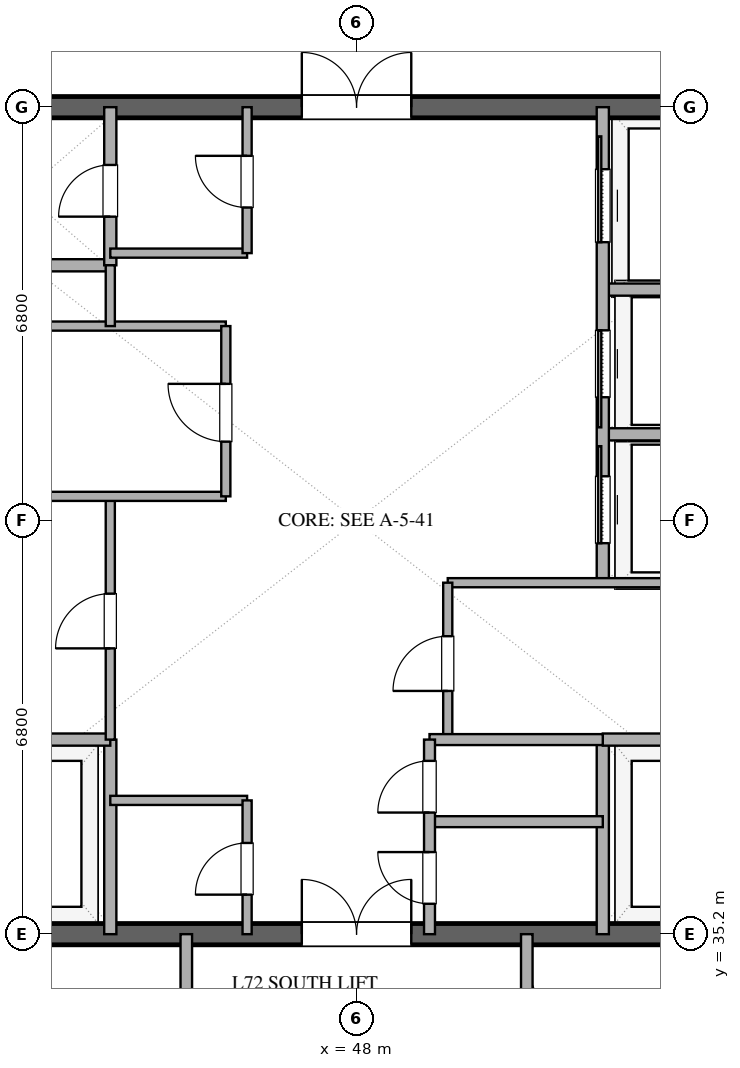
"""IFC4 building model, lengths in metres.
Left out: names, types, materials, properties, quantities, classifications, styles, units other than length and angle.
Written with IfcOpenShell. Run it as: python <this file> out.ifc"""

import sys

from ifc_helpers import new_model, si_unit, direction, frame, frame_2d, origin, place, context, subcontext, project, spatial, rectangle, extrude, element, fill, save


model = new_model("IFC4")
c1 = context("Model", 3, precision=1e-05, world=origin(), true_north=direction((0.0, 1.0)))
c2 = subcontext(c1, "Body", "Model", "MODEL_VIEW")
j1 = project(units=[si_unit("LENGTHUNIT", "METRE"), si_unit("PLANEANGLEUNIT", "RADIAN")], contexts=[c1])
p1 = place(None, origin())
s1 = spatial("IfcSite", under=j1, at=p1, CompositionType="ELEMENT")
p2 = place(p1, origin())
s2 = spatial("IfcBuilding", under=s1, at=p2, CompositionType="ELEMENT")
p3 = place(p2, frame((0.0, 0.0, 280.2)))
s3 = spatial("IfcBuildingStorey", under=s2, at=p3, CompositionType="ELEMENT", Elevation=280.2)
p4 = place(p3, frame((41.0, 35.2, 0.0), z_axis=(0.0, 0.0, 1.0), x_axis=(1.0, 0.0, 0.0)))
e1 = element("IfcWall", 1, at=p4, inside=s3, PredefinedType="SHEAR", context=c2, shape_type="SweptSolid", body=[
    extrude(rectangle(XDim=14.0, YDim=0.35, at=frame_2d((7.0, 0.0))), origin(), (0.0, 0.0, 1.0), 3.37),
])
p5 = place(p4, frame((6.1, 0.0, 0.0)))
e2 = element("IfcOpeningElement", 2, at=p5, cuts=e1, PredefinedType="OPENING", context=c2, shape_type="SweptSolid", body=[
    extrude(rectangle(XDim=1.8, YDim=2.25, at=frame_2d((0.9, 1.125))), frame((0.0, 0.185, 0.0), z_axis=(0.0, -1.0, 0.0), x_axis=(1.0, 0.0, 0.0)), (0.0, 0.0, 1.0), 0.37),
])
p6 = place(p3, frame((41.0, 48.8, 0.0), z_axis=(0.0, 0.0, 1.0), x_axis=(1.0, 0.0, 0.0)))
e3 = element("IfcWall", 3, at=p6, inside=s3, PredefinedType="SHEAR", context=c2, shape_type="SweptSolid", body=[
    extrude(rectangle(XDim=14.0, YDim=0.35, at=frame_2d((7.0, 0.0))), origin(), (0.0, 0.0, 1.0), 3.37),
])
p7 = place(p6, frame((6.1, 0.0, 0.0)))
e4 = element("IfcOpeningElement", 4, at=p7, cuts=e3, PredefinedType="OPENING", context=c2, shape_type="SweptSolid", body=[
    extrude(rectangle(XDim=1.8, YDim=2.25, at=frame_2d((0.9, 1.125))), frame((0.0, 0.185, 0.0), z_axis=(0.0, -1.0, 0.0), x_axis=(1.0, 0.0, 0.0)), (0.0, 0.0, 1.0), 0.37),
])
p8 = place(p3, frame((43.95, 35.2, 0.0), z_axis=(0.0, 0.0, 1.0), x_axis=(0.0, 1.0, 0.0)))
e5 = element("IfcWall", 5, at=p8, inside=s3, PredefinedType="SOLIDWALL", context=c2, shape_type="SweptSolid", body=[
    extrude(rectangle(XDim=3.2, YDim=0.2, at=frame_2d((1.6, 0.0))), origin(), (0.0, 0.0, 1.0), 2.73),
])
p9 = place(p3, frame((41.0, 38.4, 0.0), z_axis=(0.0, 0.0, 1.0), x_axis=(1.0, 0.0, 0.0)))
e6 = element("IfcWall", 6, at=p9, inside=s3, PredefinedType="SOLIDWALL", context=c2, shape_type="SweptSolid", body=[
    extrude(rectangle(XDim=2.95, YDim=0.2, at=frame_2d((1.475, 0.0))), origin(), (0.0, 0.0, 1.0), 2.73),
])
p10 = place(p3, frame((52.05, 35.2, 0.0), z_axis=(0.0, 0.0, 1.0), x_axis=(0.0, 1.0, 0.0)))
e7 = element("IfcWall", 7, at=p10, inside=s3, PredefinedType="SOLIDWALL", context=c2, shape_type="SweptSolid", body=[
    extrude(rectangle(XDim=3.2, YDim=0.2, at=frame_2d((1.6, 0.0))), origin(), (0.0, 0.0, 1.0), 2.73),
])
for number, where, z_axis, x_axis in (
    (8, (52.05, 38.4, 0.0), (0.0, 0.0, 1.0), (1.0, 0.0, 0.0)),
    (9, (41.0, 46.2, 0.0), (0.0, 0.0, 1.0), (1.0, 0.0, 0.0)),
):
    element("IfcWall", number, at=place(p3, frame(where, z_axis=z_axis, x_axis=x_axis)), inside=s3, PredefinedType="SOLIDWALL", context=c2, shape_type="SweptSolid", body=[
        extrude(rectangle(XDim=2.95, YDim=0.2, at=frame_2d((1.475, 0.0))), origin(), (0.0, 0.0, 1.0), 2.73),
    ])
p11 = place(p3, frame((43.95, 46.2, 0.0), z_axis=(0.0, 0.0, 1.0), x_axis=(0.0, 1.0, 0.0)))
e10 = element("IfcWall", 10, at=p11, inside=s3, PredefinedType="SOLIDWALL", context=c2, shape_type="SweptSolid", body=[
    extrude(rectangle(XDim=2.6, YDim=0.2, at=frame_2d((1.3, 0.0))), origin(), (0.0, 0.0, 1.0), 2.73),
])
p12 = place(p11, frame((0.8, 0.0, 0.0)))
e11 = element("IfcOpeningElement", 11, at=p12, cuts=e10, PredefinedType="OPENING", context=c2, shape_type="SweptSolid", body=[
    extrude(rectangle(XDim=0.85, YDim=2.15, at=frame_2d((0.425, 1.075))), frame((0.0, 0.11, 0.0), z_axis=(0.0, -1.0, 0.0), x_axis=(1.0, 0.0, 0.0)), (0.0, 0.0, 1.0), 0.22),
])
p13 = place(p3, frame((43.95, 38.4, 0.0), z_axis=(0.0, 0.0, 1.0), x_axis=(0.0, 1.0, 0.0)))
e12 = element("IfcWall", 12, at=p13, inside=s3, PredefinedType="PARTITIONING", context=c2, shape_type="SweptSolid", body=[
    extrude(rectangle(XDim=4.0, YDim=0.15, at=frame_2d((2.0, 0.0))), origin(), (0.0, 0.0, 1.0), 2.73),
])
p14 = place(p13, frame((1.5, 0.0, 0.0)))
e13 = element("IfcOpeningElement", 13, at=p14, cuts=e12, PredefinedType="OPENING", context=c2, shape_type="SweptSolid", body=[
    extrude(rectangle(XDim=0.9, YDim=2.15, at=frame_2d((0.45, 1.075))), frame((0.0, 0.085, 0.0), z_axis=(0.0, -1.0, 0.0), x_axis=(1.0, 0.0, 0.0)), (0.0, 0.0, 1.0), 0.17),
])
for number, where, z_axis, x_axis in (
    (14, (41.0, 42.4, 0.0), (0.0, 0.0, 1.0), (1.0, 0.0, 0.0)),
    (15, (41.0, 45.2, 0.0), (0.0, 0.0, 1.0), (1.0, 0.0, 0.0)),
):
    element("IfcWall", number, at=place(p3, frame(where, z_axis=z_axis, x_axis=x_axis)), inside=s3, PredefinedType="PARTITIONING", context=c2, shape_type="SweptSolid", body=[
        extrude(rectangle(XDim=4.85, YDim=0.15, at=frame_2d((2.425, 0.0))), origin(), (0.0, 0.0, 1.0), 2.73),
    ])
p15 = place(p3, frame((43.95, 45.2, 0.0), z_axis=(0.0, 0.0, 1.0), x_axis=(0.0, 1.0, 0.0)))
e16 = element("IfcWall", 16, at=p15, inside=s3, PredefinedType="PARTITIONING", context=c2, shape_type="SweptSolid", body=[
    extrude(rectangle(XDim=1.0, YDim=0.15, at=frame_2d((0.5, 0.0))), origin(), (0.0, 0.0, 1.0), 2.73),
])
p16 = place(p3, frame((45.85, 42.4, 0.0), z_axis=(0.0, 0.0, 1.0), x_axis=(0.0, 1.0, 0.0)))
e17 = element("IfcWall", 17, at=p16, inside=s3, PredefinedType="PARTITIONING", context=c2, shape_type="SweptSolid", body=[
    extrude(rectangle(XDim=2.8, YDim=0.15, at=frame_2d((1.4, 0.0))), origin(), (0.0, 0.0, 1.0), 2.73),
])
p17 = place(p16, frame((0.9, 0.0, 0.0)))
e18 = element("IfcOpeningElement", 18, at=p17, cuts=e17, PredefinedType="OPENING", context=c2, shape_type="SweptSolid", body=[
    extrude(rectangle(XDim=0.95, YDim=2.15, at=frame_2d((0.475, 1.075))), frame((0.0, 0.085, 0.0), z_axis=(0.0, -1.0, 0.0), x_axis=(1.0, 0.0, 0.0)), (0.0, 0.0, 1.0), 0.17),
])
for number, where, z_axis, x_axis in (
    (19, (52.05, 43.42, 0.0), (0.0, 0.0, 1.0), (1.0, 0.0, 0.0)),
    (20, (52.05, 45.8, 0.0), (0.0, 0.0, 1.0), (1.0, 0.0, 0.0)),
):
    element("IfcWall", number, at=place(p3, frame(where, z_axis=z_axis, x_axis=x_axis)), inside=s3, PredefinedType="SOLIDWALL", context=c2, shape_type="SweptSolid", body=[
        extrude(rectangle(XDim=2.95, YDim=0.2, at=frame_2d((1.475, 0.0))), origin(), (0.0, 0.0, 1.0), 2.73),
    ])
p18 = place(p3, frame((52.05, 40.98, 0.0), z_axis=(0.0, 0.0, 1.0), x_axis=(0.0, 1.0, 0.0)))
e21 = element("IfcWall", 21, at=p18, inside=s3, PredefinedType="SOLIDWALL", context=c2, shape_type="SweptSolid", body=[
    extrude(rectangle(XDim=7.82, YDim=0.2, at=frame_2d((3.91, 0.0))), origin(), (0.0, 0.0, 1.0), 2.73),
])
p19 = place(p18, frame((0.65, 0.0, 0.0)))
e22 = element("IfcOpeningElement", 22, at=p19, cuts=e21, PredefinedType="OPENING", context=c2, shape_type="SweptSolid", body=[
    extrude(rectangle(XDim=1.1, YDim=2.2, at=frame_2d((0.55, 1.1))), frame((0.0, 0.11, 0.0), z_axis=(0.0, -1.0, 0.0), x_axis=(1.0, 0.0, 0.0)), (0.0, 0.0, 1.0), 0.22),
])
p20 = place(p18, frame((3.05, 0.0, 0.0)))
e23 = element("IfcOpeningElement", 23, at=p20, cuts=e21, PredefinedType="OPENING", context=c2, shape_type="SweptSolid", body=[
    extrude(rectangle(XDim=1.1, YDim=2.2, at=frame_2d((0.55, 1.1))), frame((0.0, 0.11, 0.0), z_axis=(0.0, -1.0, 0.0), x_axis=(1.0, 0.0, 0.0)), (0.0, 0.0, 1.0), 0.22),
])
p21 = place(p18, frame((5.6, 0.0, 0.0)))
e24 = element("IfcOpeningElement", 24, at=p21, cuts=e21, PredefinedType="OPENING", context=c2, shape_type="SweptSolid", body=[
    extrude(rectangle(XDim=1.2, YDim=2.2, at=frame_2d((0.6, 1.1))), frame((0.0, 0.11, 0.0), z_axis=(0.0, -1.0, 0.0), x_axis=(1.0, 0.0, 0.0)), (0.0, 0.0, 1.0), 0.22),
])
p22 = place(p3, frame((49.5, 40.98, 0.0), z_axis=(0.0, 0.0, 1.0), x_axis=(1.0, 0.0, 0.0)))
e25 = element("IfcWall", 25, at=p22, inside=s3, PredefinedType="PARTITIONING", context=c2, shape_type="SweptSolid", body=[
    extrude(rectangle(XDim=5.5, YDim=0.15, at=frame_2d((2.75, 0.0))), origin(), (0.0, 0.0, 1.0), 2.73),
])
p23 = place(p3, frame((49.5, 38.4, 0.0), z_axis=(0.0, 0.0, 1.0), x_axis=(0.0, 1.0, 0.0)))
e26 = element("IfcWall", 26, at=p23, inside=s3, PredefinedType="PARTITIONING", context=c2, shape_type="SweptSolid", body=[
    extrude(rectangle(XDim=2.58, YDim=0.15, at=frame_2d((1.29, 0.0))), origin(), (0.0, 0.0, 1.0), 2.73),
])
p24 = place(p23, frame((0.8, 0.0, 0.0)))
e27 = element("IfcOpeningElement", 27, at=p24, cuts=e26, PredefinedType="OPENING", context=c2, shape_type="SweptSolid", body=[
    extrude(rectangle(XDim=0.9, YDim=2.15, at=frame_2d((0.45, 1.075))), frame((0.0, 0.085, 0.0), z_axis=(0.0, -1.0, 0.0), x_axis=(1.0, 0.0, 0.0)), (0.0, 0.0, 1.0), 0.17),
])
p25 = place(p3, frame((43.95, 37.4, 0.0), z_axis=(0.0, 0.0, 1.0), x_axis=(1.0, 0.0, 0.0)))
e28 = element("IfcWall", 28, at=p25, inside=s3, PredefinedType="PARTITIONING", context=c2, shape_type="SweptSolid", body=[
    extrude(rectangle(XDim=2.25, YDim=0.15, at=frame_2d((1.125, 0.0))), origin(), (0.0, 0.0, 1.0), 2.73),
])
p26 = place(p3, frame((46.2, 35.2, 0.0), z_axis=(0.0, 0.0, 1.0), x_axis=(0.0, 1.0, 0.0)))
e29 = element("IfcWall", 29, at=p26, inside=s3, PredefinedType="PARTITIONING", context=c2, shape_type="SweptSolid", body=[
    extrude(rectangle(XDim=2.2, YDim=0.15, at=frame_2d((1.1, 0.0))), origin(), (0.0, 0.0, 1.0), 2.73),
])
p27 = place(p26, frame((0.65, 0.0, 0.0)))
e30 = element("IfcOpeningElement", 30, at=p27, cuts=e29, PredefinedType="OPENING", context=c2, shape_type="SweptSolid", body=[
    extrude(rectangle(XDim=0.85, YDim=2.15, at=frame_2d((0.425, 1.075))), frame((0.0, 0.085, 0.0), z_axis=(0.0, -1.0, 0.0), x_axis=(1.0, 0.0, 0.0)), (0.0, 0.0, 1.0), 0.17),
])
p28 = place(p3, frame((43.95, 46.4, 0.0), z_axis=(0.0, 0.0, 1.0), x_axis=(1.0, 0.0, 0.0)))
e31 = element("IfcWall", 31, at=p28, inside=s3, PredefinedType="PARTITIONING", context=c2, shape_type="SweptSolid", body=[
    extrude(rectangle(XDim=2.25, YDim=0.15, at=frame_2d((1.125, 0.0))), origin(), (0.0, 0.0, 1.0), 2.73),
])
p29 = place(p3, frame((46.2, 46.4, 0.0), z_axis=(0.0, 0.0, 1.0), x_axis=(0.0, 1.0, 0.0)))
e32 = element("IfcWall", 32, at=p29, inside=s3, PredefinedType="PARTITIONING", context=c2, shape_type="SweptSolid", body=[
    extrude(rectangle(XDim=2.4, YDim=0.15, at=frame_2d((1.2, 0.0))), origin(), (0.0, 0.0, 1.0), 2.73),
])
p30 = place(p29, frame((0.75, 0.0, 0.0)))
e33 = element("IfcOpeningElement", 33, at=p30, cuts=e32, PredefinedType="OPENING", context=c2, shape_type="SweptSolid", body=[
    extrude(rectangle(XDim=0.85, YDim=2.15, at=frame_2d((0.425, 1.075))), frame((0.0, 0.085, 0.0), z_axis=(0.0, -1.0, 0.0), x_axis=(1.0, 0.0, 0.0)), (0.0, 0.0, 1.0), 0.17),
])
for number, where, z_axis, x_axis in (
    (34, (49.2, 37.05, 0.0), (0.0, 0.0, 1.0), (1.0, 0.0, 0.0)),
    (35, (49.2, 38.4, 0.0), (0.0, 0.0, 1.0), (1.0, 0.0, 0.0)),
):
    element("IfcWall", number, at=place(p3, frame(where, z_axis=z_axis, x_axis=x_axis)), inside=s3, PredefinedType="PLUMBINGWALL", context=c2, shape_type="SweptSolid", body=[
        extrude(rectangle(XDim=2.85, YDim=0.18, at=frame_2d((1.425, 0.0))), origin(), (0.0, 0.0, 1.0), 2.73),
    ])
p31 = place(p3, frame((49.2, 35.2, 0.0), z_axis=(0.0, 0.0, 1.0), x_axis=(0.0, 1.0, 0.0)))
e36 = element("IfcWall", 36, at=p31, inside=s3, PredefinedType="PLUMBINGWALL", context=c2, shape_type="SweptSolid", body=[
    extrude(rectangle(XDim=3.2, YDim=0.18, at=frame_2d((1.6, 0.0))), origin(), (0.0, 0.0, 1.0), 2.73),
])
p32 = place(p31, frame((0.5, 0.0, 0.0)))
e37 = element("IfcOpeningElement", 37, at=p32, cuts=e36, PredefinedType="OPENING", context=c2, shape_type="SweptSolid", body=[
    extrude(rectangle(XDim=0.85, YDim=2.1, at=frame_2d((0.425, 1.05))), frame((0.0, 0.1, 0.0), z_axis=(0.0, -1.0, 0.0), x_axis=(1.0, 0.0, 0.0)), (0.0, 0.0, 1.0), 0.2),
])
p33 = place(p31, frame((2.0, 0.0, 0.0)))
e38 = element("IfcOpeningElement", 38, at=p33, cuts=e36, PredefinedType="OPENING", context=c2, shape_type="SweptSolid", body=[
    extrude(rectangle(XDim=0.85, YDim=2.15, at=frame_2d((0.425, 1.075))), frame((0.0, 0.1, 0.0), z_axis=(0.0, -1.0, 0.0), x_axis=(1.0, 0.0, 0.0)), (0.0, 0.0, 1.0), 0.2),
])
p34 = place(p3, frame((50.8, 34.307, 0.0), z_axis=(0.0, 0.0, 1.0), x_axis=(0.342010724278, -0.939696048985, 0.0)))
e39 = element("IfcWall", 39, at=p34, inside=s3, PredefinedType="PARTITIONING", context=c2, shape_type="SweptSolid", body=[
    extrude(rectangle(XDim=8.568, YDim=0.2, at=frame_2d((4.284, 0.0))), origin(), (0.0, 0.0, 1.0), 2.73),
])
for number, where, z_axis, x_axis in (
    (40, (45.2, 33.1, 0.0), (0.0, 0.0, 1.0), (0.0, 1.0, 0.0)),
    (41, (50.8, 35.2, 0.0), (0.0, 0.0, 1.0), (0.0, -1.0, 0.0)),
):
    element("IfcWall", number, at=place(p3, frame(where, z_axis=z_axis, x_axis=x_axis)), inside=s3, PredefinedType="PARTITIONING", context=c2, shape_type="SweptSolid", body=[
        extrude(rectangle(XDim=2.1, YDim=0.19, at=frame_2d((1.05, 0.0))), origin(), (0.0, 0.0, 1.0), 2.73),
    ])
p35 = place(p5, origin())
e42 = element("IfcDoor", 42, at=p35, inside=s3, OperationType="DOUBLE_DOOR_SINGLE_SWING", PredefinedType="DOOR", context=c2, shape_type="SweptSolid", body=[
    extrude(rectangle(XDim=1.8, YDim=2.25, at=frame_2d((0.9, 1.125))), frame((0.0, 0.025, 0.0), z_axis=(0.0, -1.0, 0.0), x_axis=(1.0, 0.0, 0.0)), (0.0, 0.0, 1.0), 0.05),
])
fill(e2, e42)
p36 = place(p7, origin())
e43 = element("IfcDoor", 43, at=p36, inside=s3, OperationType="DOUBLE_DOOR_SINGLE_SWING", PredefinedType="DOOR", context=c2, shape_type="SweptSolid", body=[
    extrude(rectangle(XDim=1.8, YDim=2.25, at=frame_2d((0.9, 1.125))), frame((0.0, 0.025, 0.0), z_axis=(0.0, -1.0, 0.0), x_axis=(1.0, 0.0, 0.0)), (0.0, 0.0, 1.0), 0.05),
])
fill(e4, e43)
p37 = place(p12, origin())
e44 = element("IfcDoor", 44, at=p37, inside=s3, OperationType="SINGLE_SWING_LEFT", PredefinedType="DOOR", context=c2, shape_type="SweptSolid", body=[
    extrude(rectangle(XDim=0.85, YDim=2.15, at=frame_2d((0.425, 1.075))), frame((0.0, 0.025, 0.0), z_axis=(0.0, -1.0, 0.0), x_axis=(1.0, 0.0, 0.0)), (0.0, 0.0, 1.0), 0.05),
])
fill(e11, e44)
p38 = place(p14, origin())
e45 = element("IfcDoor", 45, at=p38, inside=s3, OperationType="SINGLE_SWING_LEFT", PredefinedType="DOOR", context=c2, shape_type="SweptSolid", body=[
    extrude(rectangle(XDim=0.9, YDim=2.15, at=frame_2d((0.45, 1.075))), frame((0.0, 0.025, 0.0), z_axis=(0.0, -1.0, 0.0), x_axis=(1.0, 0.0, 0.0)), (0.0, 0.0, 1.0), 0.05),
])
fill(e13, e45)
p39 = place(p17, origin())
e46 = element("IfcDoor", 46, at=p39, inside=s3, OperationType="SINGLE_SWING_RIGHT", PredefinedType="DOOR", context=c2, shape_type="SweptSolid", body=[
    extrude(rectangle(XDim=0.95, YDim=2.15, at=frame_2d((0.475, 1.075))), frame((0.0, 0.025, 0.0), z_axis=(0.0, -1.0, 0.0), x_axis=(1.0, 0.0, 0.0)), (0.0, 0.0, 1.0), 0.05),
])
fill(e18, e46)
p40 = place(p19, origin())
e47 = element("IfcDoor", 47, at=p40, inside=s3, OperationType="SLIDING_TO_RIGHT", PredefinedType="DOOR", context=c2, shape_type="SweptSolid", body=[
    extrude(rectangle(XDim=1.1, YDim=2.2, at=frame_2d((0.55, 1.1))), frame((0.0, 0.025, 0.0), z_axis=(0.0, -1.0, 0.0), x_axis=(1.0, 0.0, 0.0)), (0.0, 0.0, 1.0), 0.05),
])
fill(e22, e47)
p41 = place(p20, origin())
e48 = element("IfcDoor", 48, at=p41, inside=s3, OperationType="SLIDING_TO_LEFT", PredefinedType="DOOR", context=c2, shape_type="SweptSolid", body=[
    extrude(rectangle(XDim=1.1, YDim=2.2, at=frame_2d((0.55, 1.1))), frame((0.0, 0.025, 0.0), z_axis=(0.0, -1.0, 0.0), x_axis=(1.0, 0.0, 0.0)), (0.0, 0.0, 1.0), 0.05),
])
fill(e23, e48)
p42 = place(p21, origin())
e49 = element("IfcDoor", 49, at=p42, inside=s3, OperationType="SLIDING_TO_RIGHT", PredefinedType="DOOR", context=c2, shape_type="SweptSolid", body=[
    extrude(rectangle(XDim=1.2, YDim=2.2, at=frame_2d((0.6, 1.1))), frame((0.0, 0.025, 0.0), z_axis=(0.0, -1.0, 0.0), x_axis=(1.0, 0.0, 0.0)), (0.0, 0.0, 1.0), 0.05),
])
fill(e24, e49)
p43 = place(p24, origin())
e50 = element("IfcDoor", 50, at=p43, inside=s3, OperationType="SINGLE_SWING_LEFT", PredefinedType="DOOR", context=c2, shape_type="SweptSolid", body=[
    extrude(rectangle(XDim=0.9, YDim=2.15, at=frame_2d((0.45, 1.075))), frame((0.0, 0.025, 0.0), z_axis=(0.0, -1.0, 0.0), x_axis=(1.0, 0.0, 0.0)), (0.0, 0.0, 1.0), 0.05),
])
fill(e27, e50)
p44 = place(p27, origin())
e51 = element("IfcDoor", 51, at=p44, inside=s3, OperationType="SINGLE_SWING_LEFT", PredefinedType="DOOR", context=c2, shape_type="SweptSolid", body=[
    extrude(rectangle(XDim=0.85, YDim=2.15, at=frame_2d((0.425, 1.075))), frame((0.0, 0.025, 0.0), z_axis=(0.0, -1.0, 0.0), x_axis=(1.0, 0.0, 0.0)), (0.0, 0.0, 1.0), 0.05),
])
fill(e30, e51)
p45 = place(p30, origin())
e52 = element("IfcDoor", 52, at=p45, inside=s3, OperationType="SINGLE_SWING_RIGHT", PredefinedType="DOOR", context=c2, shape_type="SweptSolid", body=[
    extrude(rectangle(XDim=0.85, YDim=2.15, at=frame_2d((0.425, 1.075))), frame((0.0, 0.025, 0.0), z_axis=(0.0, -1.0, 0.0), x_axis=(1.0, 0.0, 0.0)), (0.0, 0.0, 1.0), 0.05),
])
fill(e33, e52)
p46 = place(p32, origin())
e53 = element("IfcDoor", 53, at=p46, inside=s3, OperationType="SINGLE_SWING_RIGHT", PredefinedType="DOOR", context=c2, shape_type="SweptSolid", body=[
    extrude(rectangle(XDim=0.85, YDim=2.1, at=frame_2d((0.425, 1.05))), frame((0.0, 0.025, 0.0), z_axis=(0.0, -1.0, 0.0), x_axis=(1.0, 0.0, 0.0)), (0.0, 0.0, 1.0), 0.05),
])
fill(e37, e53)
p47 = place(p33, origin())
e54 = element("IfcDoor", 54, at=p47, inside=s3, OperationType="SINGLE_SWING_LEFT", PredefinedType="DOOR", context=c2, shape_type="SweptSolid", body=[
    extrude(rectangle(XDim=0.85, YDim=2.15, at=frame_2d((0.425, 1.075))), frame((0.0, 0.025, 0.0), z_axis=(0.0, -1.0, 0.0), x_axis=(1.0, 0.0, 0.0)), (0.0, 0.0, 1.0), 0.05),
])
fill(e38, e54)
save(model, sys.argv[1])
